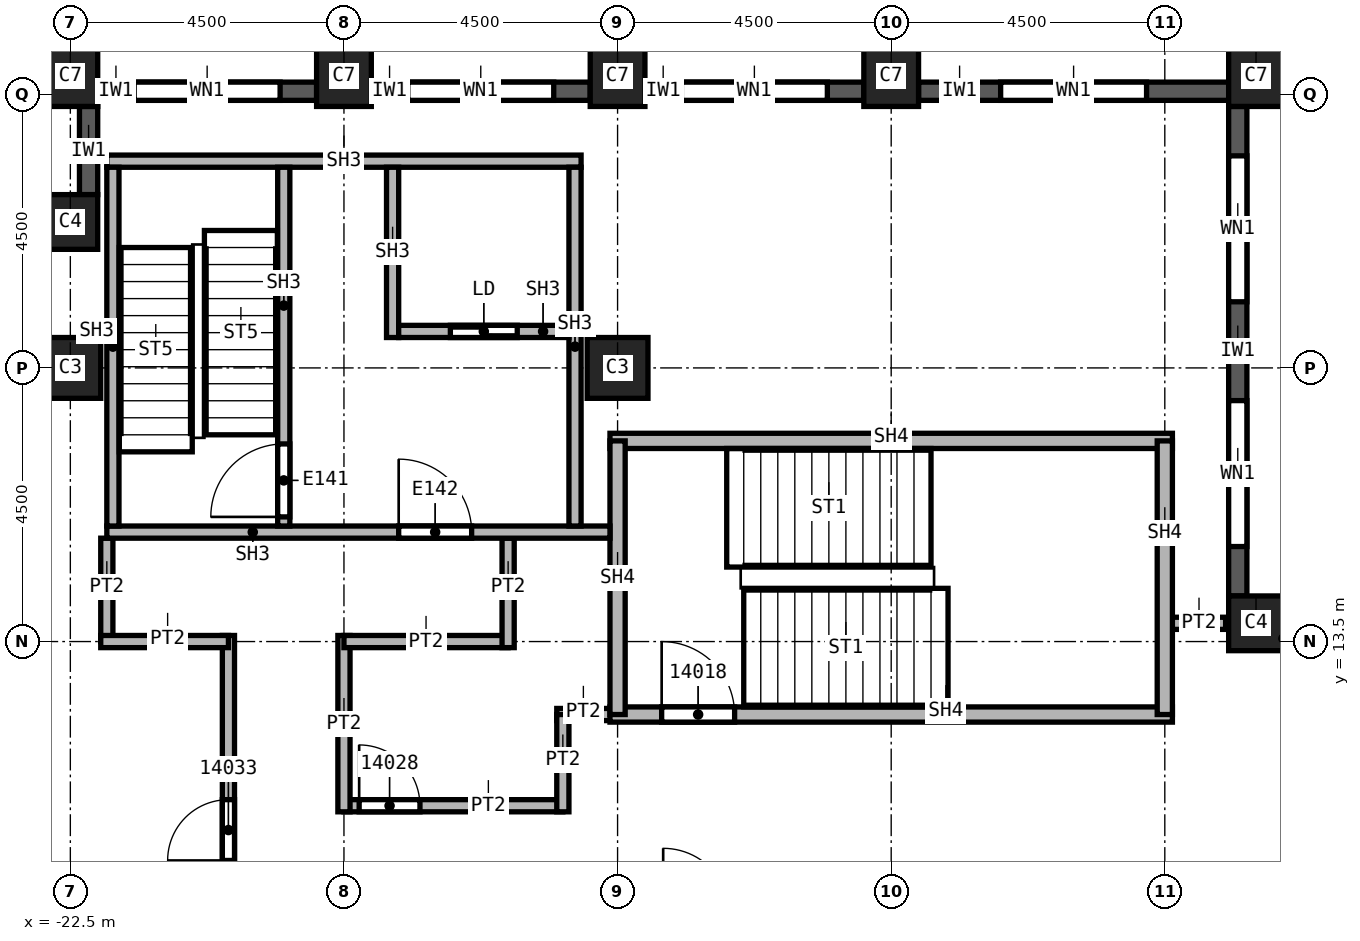
"""IFC4 building model, lengths in metres.
Left out: names, types, materials, properties, quantities, classifications, styles, units other than length and angle.
Written with IfcOpenShell. Run it as: python <this file> out.ifc"""

import sys

from ifc_helpers import new_model, si_unit, direction, frame, frame_2d, origin, origin_2d, place, context, subcontext, project, spatial, rectangle, extrude, element, fill, save


model = new_model("IFC4")
c1 = context("Model", 3, precision=1e-05, world=origin(), true_north=direction((0.0, 1.0)))
c2 = subcontext(c1, "Body", "Model", "MODEL_VIEW")
j1 = project(units=[si_unit("LENGTHUNIT", "METRE"), si_unit("PLANEANGLEUNIT", "RADIAN")], contexts=[c1])
p1 = place(None, origin())
s1 = spatial("IfcSite", under=j1, at=p1, CompositionType="ELEMENT")
p2 = place(p1, origin())
s2 = spatial("IfcBuilding", under=s1, at=p2, CompositionType="ELEMENT")
p3 = place(p2, frame((0.0, 0.0, 220.0)))
s3 = spatial("IfcBuildingStorey", under=s2, at=p3, CompositionType="ELEMENT", Elevation=220.0)
for number, where, z_axis, x_axis in (
    (1, (-13.5, 18.0, 0.0), (0.0, 0.0, 1.0), (1.0, 0.0, 0.0)),
    (2, (-22.5, 18.0, 0.0), (0.0, 0.0, 1.0), (1.0, 0.0, 0.0)),
):
    element("IfcColumn", number, at=place(p3, frame(where, z_axis=z_axis, x_axis=x_axis)), inside=s3, PredefinedType="COLUMN", context=c2, shape_type="SweptSolid", body=[
        extrude(rectangle(XDim=1.0, YDim=1.0, at=origin_2d()), origin(), (0.0, 0.0, 1.0), 3.72),
    ])
for number, where, z_axis, x_axis in (
    (3, (-3.0, 22.8, 0.0), (0.0, 0.0, 1.0), (1.0, 0.0, 0.0)),
    (4, (-9.0, 22.8, 0.0), (0.0, 0.0, 1.0), (1.0, 0.0, 0.0)),
    (5, (-13.5, 22.8, 0.0), (0.0, 0.0, 1.0), (1.0, 0.0, 0.0)),
    (6, (-18.0, 22.8, 0.0), (0.0, 0.0, 1.0), (1.0, 0.0, 0.0)),
    (7, (-22.5, 22.8, 0.0), (0.0, 0.0, 1.0), (1.0, 0.0, 0.0)),
):
    element("IfcColumn", number, at=place(p3, frame(where, z_axis=z_axis, x_axis=x_axis)), inside=s3, PredefinedType="COLUMN", context=c2, shape_type="SweptSolid", body=[
        extrude(rectangle(XDim=0.9, YDim=1.0, at=origin_2d()), origin(), (0.0, 0.0, 1.0), 3.72),
    ])
for number, where, z_axis, x_axis in (
    (8, (-3.0, 13.8, 0.0), (0.0, 0.0, 1.0), (1.0, 0.0, 0.0)),
    (9, (-22.5, 20.4, 0.0), (0.0, 0.0, 1.0), (1.0, 0.0, 0.0)),
):
    element("IfcColumn", number, at=place(p3, frame(where, z_axis=z_axis, x_axis=x_axis)), inside=s3, PredefinedType="COLUMN", context=c2, shape_type="SweptSolid", body=[
        extrude(rectangle(XDim=0.9, YDim=0.9, at=origin_2d()), origin(), (0.0, 0.0, 1.0), 3.72),
    ])
p4 = place(p3, frame((-3.3, 14.25, 0.0), z_axis=(0.0, 0.0, 1.0), x_axis=(0.0, 1.0, 0.0)))
e10 = element("IfcWall", 10, at=p4, inside=s3, PredefinedType="SOLIDWALL", context=c2, shape_type="SweptSolid", body=[
    extrude(rectangle(XDim=8.05, YDim=0.3, at=frame_2d((4.025, 0.0))), origin(), (0.0, 0.0, 1.0), 3.12),
])
p5 = place(p4, frame((0.812, 0.0, 0.8)))
e11 = element("IfcOpeningElement", 11, at=p5, cuts=e10, PredefinedType="OPENING", context=c2, shape_type="SweptSolid", body=[
    extrude(rectangle(XDim=2.4, YDim=1.95, at=frame_2d((1.2, 0.975))), frame((0.0, 0.15, 0.0), z_axis=(0.0, -1.0, 0.0), x_axis=(1.0, 0.0, 0.0)), (0.0, 0.0, 1.0), 0.3),
])
p6 = place(p4, frame((4.837, 0.0, 0.8)))
e12 = element("IfcOpeningElement", 12, at=p6, cuts=e10, PredefinedType="OPENING", context=c2, shape_type="SweptSolid", body=[
    extrude(rectangle(XDim=2.4, YDim=1.95, at=frame_2d((1.2, 0.975))), frame((0.0, 0.15, 0.0), z_axis=(0.0, -1.0, 0.0), x_axis=(1.0, 0.0, 0.0)), (0.0, 0.0, 1.0), 0.3),
])
p7 = place(p3, frame((-3.45, 22.55, 0.0), z_axis=(0.0, 0.0, 1.0), x_axis=(-1.0, 0.0, 0.0)))
e13 = element("IfcWall", 13, at=p7, inside=s3, PredefinedType="SOLIDWALL", context=c2, shape_type="SweptSolid", body=[
    extrude(rectangle(XDim=5.1, YDim=0.3, at=frame_2d((2.55, 0.0))), origin(), (0.0, 0.0, 1.0), 3.12),
])
p8 = place(p7, frame((1.35, 0.0, 0.8)))
e14 = element("IfcOpeningElement", 14, at=p8, cuts=e13, PredefinedType="OPENING", context=c2, shape_type="SweptSolid", body=[
    extrude(rectangle(XDim=2.4, YDim=1.95, at=frame_2d((1.2, 0.975))), frame((0.0, 0.15, 0.0), z_axis=(0.0, -1.0, 0.0), x_axis=(1.0, 0.0, 0.0)), (0.0, 0.0, 1.0), 0.3),
])
p9 = place(p3, frame((-9.45, 22.55, 0.0), z_axis=(0.0, 0.0, 1.0), x_axis=(-1.0, 0.0, 0.0)))
e15 = element("IfcWall", 15, at=p9, inside=s3, PredefinedType="SOLIDWALL", context=c2, shape_type="SweptSolid", body=[
    extrude(rectangle(XDim=3.6, YDim=0.3, at=frame_2d((1.8, 0.0))), origin(), (0.0, 0.0, 1.0), 3.12),
])
p10 = place(p9, frame((0.6, 0.0, 0.8)))
e16 = element("IfcOpeningElement", 16, at=p10, cuts=e15, PredefinedType="OPENING", context=c2, shape_type="SweptSolid", body=[
    extrude(rectangle(XDim=2.4, YDim=1.95, at=frame_2d((1.2, 0.975))), frame((0.0, 0.15, 0.0), z_axis=(0.0, -1.0, 0.0), x_axis=(1.0, 0.0, 0.0)), (0.0, 0.0, 1.0), 0.3),
])
p11 = place(p3, frame((-13.95, 22.55, 0.0), z_axis=(0.0, 0.0, 1.0), x_axis=(-1.0, 0.0, 0.0)))
e17 = element("IfcWall", 17, at=p11, inside=s3, PredefinedType="SOLIDWALL", context=c2, shape_type="SweptSolid", body=[
    extrude(rectangle(XDim=3.6, YDim=0.3, at=frame_2d((1.8, 0.0))), origin(), (0.0, 0.0, 1.0), 3.12),
])
p12 = place(p11, frame((0.6, 0.0, 0.8)))
e18 = element("IfcOpeningElement", 18, at=p12, cuts=e17, PredefinedType="OPENING", context=c2, shape_type="SweptSolid", body=[
    extrude(rectangle(XDim=2.4, YDim=1.95, at=frame_2d((1.2, 0.975))), frame((0.0, 0.15, 0.0), z_axis=(0.0, -1.0, 0.0), x_axis=(1.0, 0.0, 0.0)), (0.0, 0.0, 1.0), 0.3),
])
p13 = place(p3, frame((-18.45, 22.55, 0.0), z_axis=(0.0, 0.0, 1.0), x_axis=(-1.0, 0.0, 0.0)))
e19 = element("IfcWall", 19, at=p13, inside=s3, PredefinedType="SOLIDWALL", context=c2, shape_type="SweptSolid", body=[
    extrude(rectangle(XDim=3.6, YDim=0.3, at=frame_2d((1.8, 0.0))), origin(), (0.0, 0.0, 1.0), 3.12),
])
p14 = place(p13, frame((0.6, 0.0, 0.8)))
e20 = element("IfcOpeningElement", 20, at=p14, cuts=e19, PredefinedType="OPENING", context=c2, shape_type="SweptSolid", body=[
    extrude(rectangle(XDim=2.4, YDim=1.95, at=frame_2d((1.2, 0.975))), frame((0.0, 0.15, 0.0), z_axis=(0.0, -1.0, 0.0), x_axis=(1.0, 0.0, 0.0)), (0.0, 0.0, 1.0), 0.3),
])
p15 = place(p3, frame((-22.2, 22.3, 0.0), z_axis=(0.0, 0.0, 1.0), x_axis=(0.0, -1.0, 0.0)))
e21 = element("IfcWall", 21, at=p15, inside=s3, PredefinedType="SOLIDWALL", context=c2, shape_type="SweptSolid", body=[
    extrude(rectangle(XDim=1.45, YDim=0.3, at=frame_2d((0.725, 0.0))), origin(), (0.0, 0.0, 1.0), 3.12),
])
p16 = place(p3, frame((-21.9, 13.5, 0.0), z_axis=(0.0, 0.0, 1.0), x_axis=(0.0, 1.0, 0.0)))
e22 = element("IfcWall", 22, at=p16, inside=s3, PredefinedType="PARTITIONING", context=c2, shape_type="SweptSolid", body=[
    extrude(rectangle(XDim=1.7, YDim=0.2, at=frame_2d((0.85, 0.0))), origin(), (0.0, 0.0, 1.0), 3.72),
])
p17 = place(p3, frame((-19.9, 3.65, 0.0), z_axis=(0.0, 0.0, 1.0), x_axis=(0.0, 1.0, 0.0)))
e23 = element("IfcWall", 23, at=p17, inside=s3, PredefinedType="PARTITIONING", context=c2, shape_type="SweptSolid", body=[
    extrude(rectangle(XDim=9.95, YDim=0.2, at=frame_2d((4.975, 0.0))), origin(), (0.0, 0.0, 1.0), 3.72),
])
p18 = place(p17, frame((6.25, 0.0, 0.0)))
e24 = element("IfcOpeningElement", 24, at=p18, cuts=e23, PredefinedType="OPENING", context=c2, shape_type="SweptSolid", body=[
    extrude(rectangle(XDim=1.0, YDim=2.1, at=frame_2d((0.5, 1.05))), frame((0.0, 0.1, 0.0), z_axis=(0.0, -1.0, 0.0), x_axis=(1.0, 0.0, 0.0)), (0.0, 0.0, 1.0), 0.2),
])
p19 = place(p3, frame((-19.9, 13.5, 0.0), z_axis=(0.0, 0.0, 1.0), x_axis=(-1.0, 0.0, 0.0)))
e25 = element("IfcWall", 25, at=p19, inside=s3, PredefinedType="PARTITIONING", context=c2, shape_type="SweptSolid", body=[
    extrude(rectangle(XDim=2.1, YDim=0.2, at=frame_2d((1.05, 0.0))), origin(), (0.0, 0.0, 1.0), 3.72),
])
p20 = place(p3, frame((-18.0, 10.8, 0.0), z_axis=(0.0, 0.0, 1.0), x_axis=(1.0, 0.0, 0.0)))
e26 = element("IfcWall", 26, at=p20, inside=s3, PredefinedType="PARTITIONING", context=c2, shape_type="SweptSolid", body=[
    extrude(rectangle(XDim=3.6, YDim=0.2, at=frame_2d((1.8, 0.0))), origin(), (0.0, 0.0, 1.0), 3.72),
])
p21 = place(p20, frame((0.25, 0.0, 0.0)))
e27 = element("IfcOpeningElement", 27, at=p21, cuts=e26, PredefinedType="OPENING", context=c2, shape_type="SweptSolid", body=[
    extrude(rectangle(XDim=1.0, YDim=2.1, at=frame_2d((0.5, 1.05))), frame((0.0, 0.1, 0.0), z_axis=(0.0, -1.0, 0.0), x_axis=(1.0, 0.0, 0.0)), (0.0, 0.0, 1.0), 0.2),
])
p22 = place(p3, frame((-18.0, 13.6, 0.0), z_axis=(0.0, 0.0, 1.0), x_axis=(0.0, -1.0, 0.0)))
e28 = element("IfcWall", 28, at=p22, inside=s3, PredefinedType="PARTITIONING", context=c2, shape_type="SweptSolid", body=[
    extrude(rectangle(XDim=2.9, YDim=0.2, at=frame_2d((1.45, 0.0))), origin(), (0.0, 0.0, 1.0), 3.72),
])
p23 = place(p3, frame((-15.3, 13.5, 0.0), z_axis=(0.0, 0.0, 1.0), x_axis=(-1.0, 0.0, 0.0)))
e29 = element("IfcWall", 29, at=p23, inside=s3, PredefinedType="PARTITIONING", context=c2, shape_type="SweptSolid", body=[
    extrude(rectangle(XDim=2.7, YDim=0.2, at=frame_2d((1.35, 0.0))), origin(), (0.0, 0.0, 1.0), 3.72),
])
p24 = place(p3, frame((-15.3, 15.2, 0.0), z_axis=(0.0, 0.0, 1.0), x_axis=(0.0, -1.0, 0.0)))
e30 = element("IfcWall", 30, at=p24, inside=s3, PredefinedType="PARTITIONING", context=c2, shape_type="SweptSolid", body=[
    extrude(rectangle(XDim=1.8, YDim=0.2, at=frame_2d((0.9, 0.0))), origin(), (0.0, 0.0, 1.0), 3.72),
])
p25 = place(p3, frame((-14.5, 12.3, 0.0), z_axis=(0.0, 0.0, 1.0), x_axis=(1.0, 0.0, 0.0)))
e31 = element("IfcWall", 31, at=p25, inside=s3, PredefinedType="PARTITIONING", context=c2, shape_type="SweptSolid", body=[
    extrude(rectangle(XDim=1.125, YDim=0.2, at=frame_2d((0.562, 0.0))), origin(), (0.0, 0.0, 1.0), 3.72),
])
p26 = place(p3, frame((-14.4, 10.7, 0.0), z_axis=(0.0, 0.0, 1.0), x_axis=(0.0, 1.0, 0.0)))
e32 = element("IfcWall", 32, at=p26, inside=s3, PredefinedType="PARTITIONING", context=c2, shape_type="SweptSolid", body=[
    extrude(rectangle(XDim=1.6, YDim=0.2, at=frame_2d((0.8, 0.0))), origin(), (0.0, 0.0, 1.0), 3.72),
])
p27 = place(p3, frame((-4.5, 13.8, 0.0), z_axis=(0.0, 0.0, 1.0), x_axis=(1.0, 0.0, 0.0)))
e33 = element("IfcWall", 33, at=p27, inside=s3, PredefinedType="PARTITIONING", context=c2, shape_type="SweptSolid", body=[
    extrude(rectangle(XDim=1.0, YDim=0.2, at=frame_2d((0.5, 0.0))), origin(), (0.0, 0.0, 1.0), 3.72),
])
p28 = place(p3, frame((-13.625, 12.3, 0.0), z_axis=(0.0, 0.0, 1.0), x_axis=(1.0, 0.0, 0.0)))
e34 = element("IfcWall", 34, at=p28, inside=s3, PredefinedType="SOLIDWALL", context=c2, shape_type="SweptSolid", body=[
    extrude(rectangle(XDim=9.25, YDim=0.25, at=frame_2d((4.625, 0.0))), origin(), (0.0, 0.0, 1.0), 3.72),
])
p29 = place(p28, frame((0.85, 0.0, 0.0)))
e35 = element("IfcOpeningElement", 35, at=p29, cuts=e34, PredefinedType="OPENING", context=c2, shape_type="SweptSolid", body=[
    extrude(rectangle(XDim=1.2, YDim=2.1, at=frame_2d((0.6, 1.05))), frame((0.0, 0.125, 0.0), z_axis=(0.0, -1.0, 0.0), x_axis=(1.0, 0.0, 0.0)), (0.0, 0.0, 1.0), 0.25),
])
p30 = place(p3, frame((-13.625, 16.8, 0.0), z_axis=(0.0, 0.0, 1.0), x_axis=(1.0, 0.0, 0.0)))
e36 = element("IfcWall", 36, at=p30, inside=s3, PredefinedType="SOLIDWALL", context=c2, shape_type="SweptSolid", body=[
    extrude(rectangle(XDim=9.25, YDim=0.25, at=frame_2d((4.625, 0.0))), origin(), (0.0, 0.0, 1.0), 3.72),
])
for number, where, z_axis, x_axis in (
    (37, (-13.5, 12.3, 0.0), (0.0, 0.0, 1.0), (0.0, 1.0, 0.0)),
    (38, (-4.5, 16.8, 0.0), (0.0, 0.0, 1.0), (0.0, -1.0, 0.0)),
):
    element("IfcWall", number, at=place(p3, frame(where, z_axis=z_axis, x_axis=x_axis)), inside=s3, PredefinedType="SOLIDWALL", context=c2, shape_type="SweptSolid", body=[
        extrude(rectangle(XDim=4.5, YDim=0.25, at=frame_2d((2.25, 0.0))), origin(), (0.0, 0.0, 1.0), 3.72),
    ])
p31 = place(p3, frame((-21.9, 15.3, 0.0), z_axis=(0.0, 0.0, 1.0), x_axis=(1.0, 0.0, 0.0)))
e39 = element("IfcWall", 39, at=p31, inside=s3, PredefinedType="SOLIDWALL", context=c2, shape_type="SweptSolid", body=[
    extrude(rectangle(XDim=8.275, YDim=0.2, at=frame_2d((4.137, 0.0))), origin(), (0.0, 0.0, 1.0), 3.72),
])
p32 = place(p31, frame((4.8, 0.0, 0.0)))
e40 = element("IfcOpeningElement", 40, at=p32, cuts=e39, PredefinedType="OPENING", context=c2, shape_type="SweptSolid", body=[
    extrude(rectangle(XDim=1.2, YDim=2.1, at=frame_2d((0.6, 1.05))), frame((0.0, 0.1, 0.0), z_axis=(0.0, -1.0, 0.0), x_axis=(1.0, 0.0, 0.0)), (0.0, 0.0, 1.0), 0.2),
])
p33 = place(p3, frame((-21.9, 21.4, 0.0), z_axis=(0.0, 0.0, 1.0), x_axis=(1.0, 0.0, 0.0)))
e41 = element("IfcWall", 41, at=p33, inside=s3, PredefinedType="SOLIDWALL", context=c2, shape_type="SweptSolid", body=[
    extrude(rectangle(XDim=7.8, YDim=0.2, at=frame_2d((3.9, 0.0))), origin(), (0.0, 0.0, 1.0), 3.72),
])
for number, where, z_axis, x_axis in (
    (42, (-21.8, 15.4, 0.0), (0.0, 0.0, 1.0), (0.0, 1.0, 0.0)),
    (43, (-14.2, 15.4, 0.0), (0.0, 0.0, 1.0), (0.0, 1.0, 0.0)),
):
    element("IfcWall", number, at=place(p3, frame(where, z_axis=z_axis, x_axis=x_axis)), inside=s3, PredefinedType="SOLIDWALL", context=c2, shape_type="SweptSolid", body=[
        extrude(rectangle(XDim=5.9, YDim=0.2, at=frame_2d((2.95, 0.0))), origin(), (0.0, 0.0, 1.0), 3.72),
    ])
p34 = place(p3, frame((-18.99, 15.4, 0.0), z_axis=(0.0, 0.0, 1.0), x_axis=(0.0, 1.0, 0.0)))
e44 = element("IfcWall", 44, at=p34, inside=s3, PredefinedType="SOLIDWALL", context=c2, shape_type="SweptSolid", body=[
    extrude(rectangle(XDim=5.9, YDim=0.2, at=frame_2d((2.95, 0.0))), origin(), (0.0, 0.0, 1.0), 3.72),
])
p35 = place(p34, frame((0.15, 0.0, 0.0)))
e45 = element("IfcOpeningElement", 45, at=p35, cuts=e44, PredefinedType="OPENING", context=c2, shape_type="SweptSolid", body=[
    extrude(rectangle(XDim=1.2, YDim=2.1, at=frame_2d((0.6, 1.05))), frame((0.0, 0.1, 0.0), z_axis=(0.0, -1.0, 0.0), x_axis=(1.0, 0.0, 0.0)), (0.0, 0.0, 1.0), 0.2),
])
p36 = place(p3, frame((-17.2, 18.5, 0.0), z_axis=(0.0, 0.0, 1.0), x_axis=(0.0, 1.0, 0.0)))
e46 = element("IfcWall", 46, at=p36, inside=s3, PredefinedType="SOLIDWALL", context=c2, shape_type="SweptSolid", body=[
    extrude(rectangle(XDim=2.8, YDim=0.2, at=frame_2d((1.4, 0.0))), origin(), (0.0, 0.0, 1.0), 3.72),
])
p37 = place(p3, frame((-17.1, 18.6, 0.0), z_axis=(0.0, 0.0, 1.0), x_axis=(1.0, 0.0, 0.0)))
e47 = element("IfcWall", 47, at=p37, inside=s3, PredefinedType="SOLIDWALL", context=c2, shape_type="SweptSolid", body=[
    extrude(rectangle(XDim=2.8, YDim=0.2, at=frame_2d((1.4, 0.0))), origin(), (0.0, 0.0, 1.0), 3.72),
])
p38 = place(p37, frame((0.85, 0.0, 0.0)))
e48 = element("IfcOpeningElement", 48, at=p38, cuts=e47, PredefinedType="OPENING", context=c2, shape_type="SweptSolid", body=[
    extrude(rectangle(XDim=1.1, YDim=2.1, at=frame_2d((0.55, 1.05))), frame((0.0, 0.1, 0.0), z_axis=(0.0, -1.0, 0.0), x_axis=(1.0, 0.0, 0.0)), (0.0, 0.0, 1.0), 0.2),
])
p39 = place(p5, origin())
e49 = element("IfcWindow", 49, at=p39, inside=s3, PartitioningType="SINGLE_PANEL", PredefinedType="WINDOW", context=c2, shape_type="SweptSolid", body=[
    extrude(rectangle(XDim=2.4, YDim=1.95, at=frame_2d((1.2, 0.975))), frame((0.0, 0.03, 0.0), z_axis=(0.0, -1.0, 0.0), x_axis=(1.0, 0.0, 0.0)), (0.0, 0.0, 1.0), 0.06),
])
fill(e11, e49)
p40 = place(p6, origin())
e50 = element("IfcWindow", 50, at=p40, inside=s3, PartitioningType="SINGLE_PANEL", PredefinedType="WINDOW", context=c2, shape_type="SweptSolid", body=[
    extrude(rectangle(XDim=2.4, YDim=1.95, at=frame_2d((1.2, 0.975))), frame((0.0, 0.03, 0.0), z_axis=(0.0, -1.0, 0.0), x_axis=(1.0, 0.0, 0.0)), (0.0, 0.0, 1.0), 0.06),
])
fill(e12, e50)
p41 = place(p8, origin())
e51 = element("IfcWindow", 51, at=p41, inside=s3, PartitioningType="SINGLE_PANEL", PredefinedType="WINDOW", context=c2, shape_type="SweptSolid", body=[
    extrude(rectangle(XDim=2.4, YDim=1.95, at=frame_2d((1.2, 0.975))), frame((0.0, 0.03, 0.0), z_axis=(0.0, -1.0, 0.0), x_axis=(1.0, 0.0, 0.0)), (0.0, 0.0, 1.0), 0.06),
])
fill(e14, e51)
p42 = place(p10, origin())
e52 = element("IfcWindow", 52, at=p42, inside=s3, PartitioningType="SINGLE_PANEL", PredefinedType="WINDOW", context=c2, shape_type="SweptSolid", body=[
    extrude(rectangle(XDim=2.4, YDim=1.95, at=frame_2d((1.2, 0.975))), frame((0.0, 0.03, 0.0), z_axis=(0.0, -1.0, 0.0), x_axis=(1.0, 0.0, 0.0)), (0.0, 0.0, 1.0), 0.06),
])
fill(e16, e52)
p43 = place(p12, origin())
e53 = element("IfcWindow", 53, at=p43, inside=s3, PartitioningType="SINGLE_PANEL", PredefinedType="WINDOW", context=c2, shape_type="SweptSolid", body=[
    extrude(rectangle(XDim=2.4, YDim=1.95, at=frame_2d((1.2, 0.975))), frame((0.0, 0.03, 0.0), z_axis=(0.0, -1.0, 0.0), x_axis=(1.0, 0.0, 0.0)), (0.0, 0.0, 1.0), 0.06),
])
fill(e18, e53)
p44 = place(p14, origin())
e54 = element("IfcWindow", 54, at=p44, inside=s3, PartitioningType="SINGLE_PANEL", PredefinedType="WINDOW", context=c2, shape_type="SweptSolid", body=[
    extrude(rectangle(XDim=2.4, YDim=1.95, at=frame_2d((1.2, 0.975))), frame((0.0, 0.03, 0.0), z_axis=(0.0, -1.0, 0.0), x_axis=(1.0, 0.0, 0.0)), (0.0, 0.0, 1.0), 0.06),
])
fill(e20, e54)
p45 = place(p29, origin())
e55 = element("IfcDoor", 55, at=p45, inside=s3, OperationType="SINGLE_SWING_LEFT", PredefinedType="DOOR", context=c2, shape_type="SweptSolid", body=[
    extrude(rectangle(XDim=1.2, YDim=2.1, at=frame_2d((0.6, 1.05))), frame((0.0, 0.025, 0.0), z_axis=(0.0, -1.0, 0.0), x_axis=(1.0, 0.0, 0.0)), (0.0, 0.0, 1.0), 0.05),
])
fill(e35, e55)
p46 = place(p21, origin())
e56 = element("IfcDoor", 56, at=p46, inside=s3, OperationType="SINGLE_SWING_LEFT", PredefinedType="DOOR", context=c2, shape_type="SweptSolid", body=[
    extrude(rectangle(XDim=1.0, YDim=2.1, at=frame_2d((0.5, 1.05))), frame((0.0, 0.025, 0.0), z_axis=(0.0, -1.0, 0.0), x_axis=(1.0, 0.0, 0.0)), (0.0, 0.0, 1.0), 0.05),
])
fill(e27, e56)
p47 = place(p18, origin())
e57 = element("IfcDoor", 57, at=p47, inside=s3, OperationType="SINGLE_SWING_RIGHT", PredefinedType="DOOR", context=c2, shape_type="SweptSolid", body=[
    extrude(rectangle(XDim=1.0, YDim=2.1, at=frame_2d((0.5, 1.05))), frame((0.0, 0.025, 0.0), z_axis=(0.0, -1.0, 0.0), x_axis=(1.0, 0.0, 0.0)), (0.0, 0.0, 1.0), 0.05),
])
fill(e24, e57)
p48 = place(p35, origin())
e58 = element("IfcDoor", 58, at=p48, inside=s3, OperationType="SINGLE_SWING_LEFT", PredefinedType="DOOR", context=c2, shape_type="SweptSolid", body=[
    extrude(rectangle(XDim=1.2, YDim=2.1, at=frame_2d((0.6, 1.05))), frame((0.0, 0.025, 0.0), z_axis=(0.0, -1.0, 0.0), x_axis=(1.0, 0.0, 0.0)), (0.0, 0.0, 1.0), 0.05),
])
fill(e45, e58)
p49 = place(p38, origin())
e59 = element("IfcDoor", 59, at=p49, inside=s3, OperationType="SLIDING_TO_LEFT", PredefinedType="DOOR", context=c2, shape_type="SweptSolid", body=[
    extrude(rectangle(XDim=1.1, YDim=2.1, at=frame_2d((0.55, 1.05))), frame((0.0, 0.025, 0.0), z_axis=(0.0, -1.0, 0.0), x_axis=(1.0, 0.0, 0.0)), (0.0, 0.0, 1.0), 0.05),
])
fill(e48, e59)
p50 = place(p32, origin())
e60 = element("IfcDoor", 60, at=p50, inside=s3, OperationType="SINGLE_SWING_RIGHT", PredefinedType="DOOR", context=c2, shape_type="SweptSolid", body=[
    extrude(rectangle(XDim=1.2, YDim=2.1, at=frame_2d((0.6, 1.05))), frame((0.0, 0.025, 0.0), z_axis=(0.0, -1.0, 0.0), x_axis=(1.0, 0.0, 0.0)), (0.0, 0.0, 1.0), 0.05),
])
fill(e40, e60)
save(model, sys.argv[1])
